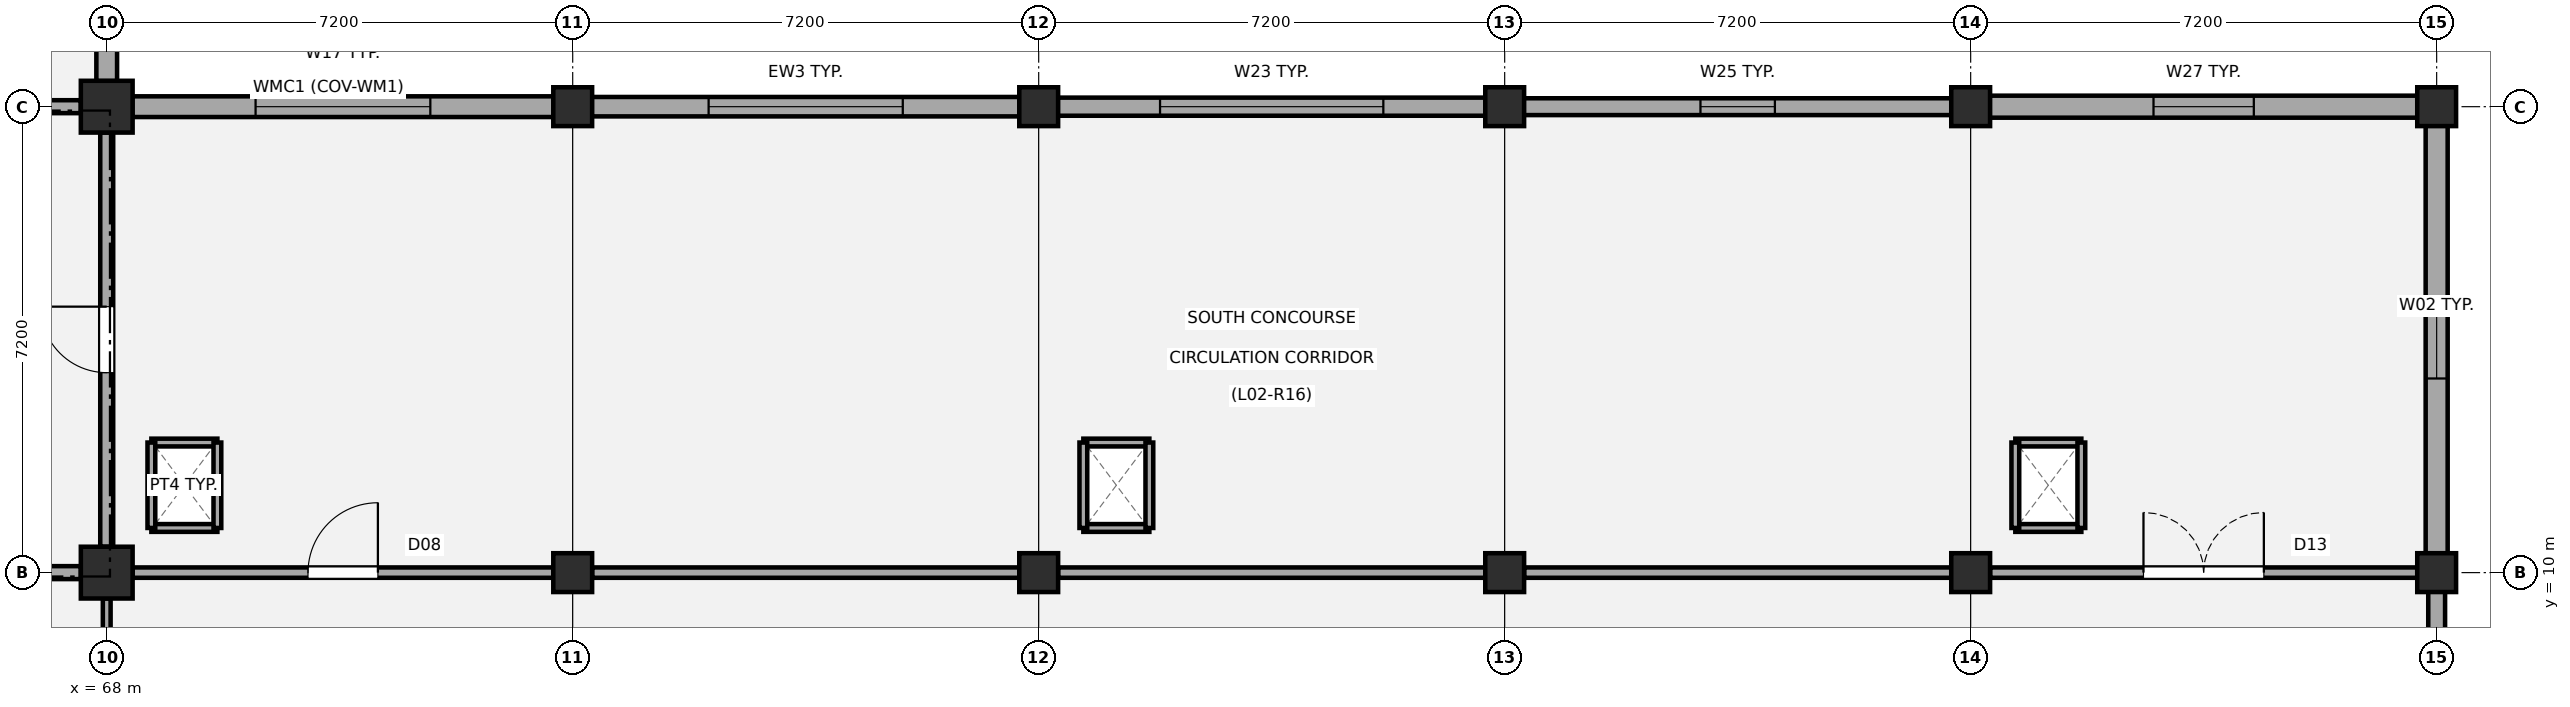
"""IFC4 building model, lengths in metres.
Left out: names, types, materials, properties, quantities, classifications, styles, units other than length and angle.
Written with IfcOpenShell. Run it as: python <this file> out.ifc"""

import sys

from ifc_helpers import new_model, si_unit, direction, frame, frame_2d, origin, origin_2d, place, context, subcontext, project, spatial, rectangle, extrude, element, fill, save


model = new_model("IFC4")
c1 = context("Model", 3, precision=1e-05, world=origin(), true_north=direction((0.0, 1.0)))
c2 = subcontext(c1, "Body", "Model", "MODEL_VIEW")
j1 = project(units=[si_unit("LENGTHUNIT", "METRE"), si_unit("PLANEANGLEUNIT", "RADIAN")], contexts=[c1])
p1 = place(None, origin())
s1 = spatial("IfcSite", under=j1, at=p1, CompositionType="ELEMENT")
p2 = place(p1, origin())
s2 = spatial("IfcBuilding", under=s1, at=p2, CompositionType="ELEMENT")
p3 = place(p2, frame((0.0, 0.0, 9.18)))
s3 = spatial("IfcBuildingStorey", under=s2, at=p3, CompositionType="ELEMENT", Elevation=9.18)
for number, where, z_axis, x_axis in (
    (1, (68.0, 10.0, 0.0), (0.0, 0.0, 1.0), (1.0, 0.0, 0.0)),
    (2, (68.0, 17.2, 0.0), (0.0, 0.0, 1.0), (1.0, 0.0, 0.0)),
):
    element("IfcColumn", number, at=place(p3, frame(where, z_axis=z_axis, x_axis=x_axis)), inside=s3, PredefinedType="COLUMN", context=c2, shape_type="SweptSolid", body=[
        extrude(rectangle(XDim=0.8, YDim=0.8, at=origin_2d()), origin(), (0.0, 0.0, 1.0), 4.32),
    ])
for number, where, z_axis, x_axis in (
    (3, (75.2, 10.0, 0.0), (0.0, 0.0, 1.0), (1.0, 0.0, 0.0)),
    (4, (75.2, 17.2, 0.0), (0.0, 0.0, 1.0), (1.0, 0.0, 0.0)),
    (5, (82.4, 10.0, 0.0), (0.0, 0.0, 1.0), (1.0, 0.0, 0.0)),
    (6, (82.4, 17.2, 0.0), (0.0, 0.0, 1.0), (1.0, 0.0, 0.0)),
    (7, (89.6, 10.0, 0.0), (0.0, 0.0, 1.0), (1.0, 0.0, 0.0)),
    (8, (89.6, 17.2, 0.0), (0.0, 0.0, 1.0), (1.0, 0.0, 0.0)),
    (9, (96.8, 10.0, 0.0), (0.0, 0.0, 1.0), (1.0, 0.0, 0.0)),
    (10, (96.8, 17.2, 0.0), (0.0, 0.0, 1.0), (1.0, 0.0, 0.0)),
    (11, (104.0, 10.0, 0.0), (0.0, 0.0, 1.0), (1.0, 0.0, 0.0)),
    (12, (104.0, 17.2, 0.0), (0.0, 0.0, 1.0), (1.0, 0.0, 0.0)),
):
    element("IfcColumn", number, at=place(p3, frame(where, z_axis=z_axis, x_axis=x_axis)), inside=s3, PredefinedType="COLUMN", context=c2, shape_type="SweptSolid", body=[
        extrude(rectangle(XDim=0.6, YDim=0.6, at=origin_2d()), origin(), (0.0, 0.0, 1.0), 4.32),
    ])
p4 = place(p3, frame((68.395, 17.2, 0.0), z_axis=(0.0, 0.0, 1.0), x_axis=(1.0, 0.0, 0.0)))
e13 = element("IfcWall", 13, at=p4, inside=s3, PredefinedType="STANDARD", context=c2, shape_type="SweptSolid", body=[
    extrude(rectangle(XDim=6.51, YDim=0.32, at=frame_2d((3.255, 0.0))), origin(), (0.0, 0.0, 1.0), 3.48),
])
p5 = place(p4, frame((1.905, 0.0, 0.95)))
e14 = element("IfcOpeningElement", 14, at=p5, cuts=e13, PredefinedType="OPENING", context=c2, shape_type="SweptSolid", body=[
    extrude(rectangle(XDim=2.7, YDim=1.7, at=frame_2d((1.35, 0.85))), frame((0.0, 0.17, 0.0), z_axis=(0.0, -1.0, 0.0), x_axis=(1.0, 0.0, 0.0)), (0.0, 0.0, 1.0), 0.34),
])
p6 = place(p3, frame((75.495, 17.2, 0.0), z_axis=(0.0, 0.0, 1.0), x_axis=(1.0, 0.0, 0.0)))
e15 = element("IfcWall", 15, at=p6, inside=s3, PredefinedType="STANDARD", context=c2, shape_type="SweptSolid", body=[
    extrude(rectangle(XDim=6.61, YDim=0.3, at=frame_2d((3.305, 0.0))), origin(), (0.0, 0.0, 1.0), 3.48),
])
p7 = place(p6, frame((1.805, 0.0, 0.95)))
e16 = element("IfcOpeningElement", 16, at=p7, cuts=e15, PredefinedType="OPENING", context=c2, shape_type="SweptSolid", body=[
    extrude(rectangle(XDim=3.0, YDim=1.85, at=frame_2d((1.5, 0.925))), frame((0.0, 0.16, 0.0), z_axis=(0.0, -1.0, 0.0), x_axis=(1.0, 0.0, 0.0)), (0.0, 0.0, 1.0), 0.32),
])
p8 = place(p3, frame((82.695, 17.2, 0.0), z_axis=(0.0, 0.0, 1.0), x_axis=(1.0, 0.0, 0.0)))
e17 = element("IfcWall", 17, at=p8, inside=s3, PredefinedType="STANDARD", context=c2, shape_type="SweptSolid", body=[
    extrude(rectangle(XDim=6.61, YDim=0.28, at=frame_2d((3.305, 0.0))), origin(), (0.0, 0.0, 1.0), 3.48),
])
p9 = place(p8, frame((1.58, 0.0, 0.95)))
e18 = element("IfcOpeningElement", 18, at=p9, cuts=e17, PredefinedType="OPENING", context=c2, shape_type="SweptSolid", body=[
    extrude(rectangle(XDim=3.45, YDim=2.0, at=frame_2d((1.725, 1.0))), frame((0.0, 0.15, 0.0), z_axis=(0.0, -1.0, 0.0), x_axis=(1.0, 0.0, 0.0)), (0.0, 0.0, 1.0), 0.3),
])
p10 = place(p3, frame((89.895, 17.2, 0.0), z_axis=(0.0, 0.0, 1.0), x_axis=(1.0, 0.0, 0.0)))
e19 = element("IfcWall", 19, at=p10, inside=s3, PredefinedType="STANDARD", context=c2, shape_type="SweptSolid", body=[
    extrude(rectangle(XDim=6.61, YDim=0.26, at=frame_2d((3.305, 0.0))), origin(), (0.0, 0.0, 1.0), 3.48),
])
p11 = place(p10, frame((2.73, 0.0, 0.95)))
e20 = element("IfcOpeningElement", 20, at=p11, cuts=e19, PredefinedType="OPENING", context=c2, shape_type="SweptSolid", body=[
    extrude(rectangle(XDim=1.15, YDim=1.15, at=frame_2d((0.575, 0.575))), frame((0.0, 0.14, 0.0), z_axis=(0.0, -1.0, 0.0), x_axis=(1.0, 0.0, 0.0)), (0.0, 0.0, 1.0), 0.28),
])
p12 = place(p3, frame((97.095, 17.2, 0.0), z_axis=(0.0, 0.0, 1.0), x_axis=(1.0, 0.0, 0.0)))
e21 = element("IfcWall", 21, at=p12, inside=s3, PredefinedType="STANDARD", context=c2, shape_type="SweptSolid", body=[
    extrude(rectangle(XDim=6.61, YDim=0.34, at=frame_2d((3.305, 0.0))), origin(), (0.0, 0.0, 1.0), 3.48),
])
p13 = place(p12, frame((2.53, 0.0, 0.95)))
e22 = element("IfcOpeningElement", 22, at=p13, cuts=e21, PredefinedType="OPENING", context=c2, shape_type="SweptSolid", body=[
    extrude(rectangle(XDim=1.55, YDim=1.25, at=frame_2d((0.775, 0.625))), frame((0.0, 0.18, 0.0), z_axis=(0.0, -1.0, 0.0), x_axis=(1.0, 0.0, 0.0)), (0.0, 0.0, 1.0), 0.36),
])
p14 = place(p3, frame((68.0, 24.005, 0.0), z_axis=(0.0, 0.0, 1.0), x_axis=(0.0, -1.0, 0.0)))
e23 = element("IfcWall", 23, at=p14, inside=s3, PredefinedType="STANDARD", context=c2, shape_type="SweptSolid", body=[
    extrude(rectangle(XDim=6.41, YDim=0.32, at=frame_2d((3.205, 0.0))), origin(), (0.0, 0.0, 1.0), 3.48),
])
p15 = place(p3, frame((104.0, 9.705, 0.0), z_axis=(0.0, 0.0, 1.0), x_axis=(0.0, -1.0, 0.0)))
e24 = element("IfcWall", 24, at=p15, inside=s3, PredefinedType="STANDARD", context=c2, shape_type="SweptSolid", body=[
    extrude(rectangle(XDim=7.985, YDim=0.26, at=frame_2d((3.993, 0.0))), origin(), (0.0, 0.0, 1.0), 3.48),
])
p16 = place(p15, frame((3.442, 0.0, 0.95)))
e25 = element("IfcOpeningElement", 25, at=p16, cuts=e24, PredefinedType="OPENING", context=c2, shape_type="SweptSolid", body=[
    extrude(rectangle(XDim=1.1, YDim=1.4, at=frame_2d((0.55, 0.7))), frame((0.0, 0.14, 0.0), z_axis=(0.0, -1.0, 0.0), x_axis=(1.0, 0.0, 0.0)), (0.0, 0.0, 1.0), 0.28),
])
p17 = place(p3, frame((104.0, 16.905, 0.0), z_axis=(0.0, 0.0, 1.0), x_axis=(0.0, -1.0, 0.0)))
e26 = element("IfcWall", 26, at=p17, inside=s3, PredefinedType="STANDARD", context=c2, shape_type="SweptSolid", body=[
    extrude(rectangle(XDim=6.61, YDim=0.34, at=frame_2d((3.305, 0.0))), origin(), (0.0, 0.0, 1.0), 3.48),
])
p18 = place(p17, frame((2.705, 0.0, 0.95)))
e27 = element("IfcOpeningElement", 27, at=p18, cuts=e26, PredefinedType="OPENING", context=c2, shape_type="SweptSolid", body=[
    extrude(rectangle(XDim=1.2, YDim=1.5, at=frame_2d((0.6, 0.75))), frame((0.0, 0.18, 0.0), z_axis=(0.0, -1.0, 0.0), x_axis=(1.0, 0.0, 0.0)), (0.0, 0.0, 1.0), 0.36),
])
p19 = place(p3, frame((68.0, 10.4, 0.0), z_axis=(0.0, 0.0, 1.0), x_axis=(0.0, 1.0, 0.0)))
e28 = element("IfcWall", 28, at=p19, inside=s3, PredefinedType="PARTITIONING", context=c2, shape_type="SweptSolid", body=[
    extrude(rectangle(XDim=6.4, YDim=0.2, at=frame_2d((3.2, 0.0))), origin(), (0.0, 0.0, 1.0), 3.43),
])
p20 = place(p19, frame((2.69, 0.0, 0.0)))
e29 = element("IfcOpeningElement", 29, at=p20, cuts=e28, PredefinedType="OPENING", context=c2, shape_type="SweptSolid", body=[
    extrude(rectangle(XDim=1.02, YDim=2.15, at=frame_2d((0.51, 1.075))), frame((0.0, 0.11, 0.0), z_axis=(0.0, -1.0, 0.0), x_axis=(1.0, 0.0, 0.0)), (0.0, 0.0, 1.0), 0.22),
])
p21 = place(p3, frame((65.34, 10.0, 0.0), z_axis=(0.0, 0.0, 1.0), x_axis=(1.0, 0.0, 0.0)))
e30 = element("IfcWall", 30, at=p21, inside=s3, PredefinedType="PARTITIONING", context=c2, shape_type="SweptSolid", body=[
    extrude(rectangle(XDim=2.26, YDim=0.2, at=frame_2d((1.13, 0.0))), origin(), (0.0, 0.0, 1.0), 3.41),
])
p22 = place(p3, frame((65.34, 17.2, 0.0), z_axis=(0.0, 0.0, 1.0), x_axis=(1.0, 0.0, 0.0)))
e31 = element("IfcWall", 31, at=p22, inside=s3, PredefinedType="PARTITIONING", context=c2, shape_type="SweptSolid", body=[
    extrude(rectangle(XDim=2.26, YDim=0.2, at=frame_2d((1.13, 0.0))), origin(), (0.0, 0.0, 1.0), 3.38),
])
for number, where, z_axis, x_axis in (
    (32, (68.69, 10.69, 0.0), (0.0, 0.0, 1.0), (1.0, 0.0, 0.0)),
    (33, (68.69, 12.01, 0.0), (0.0, 0.0, 1.0), (1.0, 0.0, 0.0)),
):
    element("IfcWall", number, at=place(p3, frame(where, z_axis=z_axis, x_axis=x_axis)), inside=s3, PredefinedType="PARTITIONING", context=c2, shape_type="SweptSolid", body=[
        extrude(rectangle(XDim=1.02, YDim=0.12, at=frame_2d((0.51, 0.0))), origin(), (0.0, 0.0, 1.0), 4.02),
    ])
for number, where, z_axis, x_axis in (
    (34, (68.69, 10.69, 0.0), (0.0, 0.0, 1.0), (0.0, 1.0, 0.0)),
    (35, (69.71, 10.69, 0.0), (0.0, 0.0, 1.0), (0.0, 1.0, 0.0)),
):
    element("IfcWall", number, at=place(p3, frame(where, z_axis=z_axis, x_axis=x_axis)), inside=s3, PredefinedType="PARTITIONING", context=c2, shape_type="SweptSolid", body=[
        extrude(rectangle(XDim=1.32, YDim=0.12, at=frame_2d((0.66, 0.0))), origin(), (0.0, 0.0, 1.0), 4.02),
    ])
for number, where, z_axis, x_axis in (
    (36, (83.09, 10.69, 0.0), (0.0, 0.0, 1.0), (1.0, 0.0, 0.0)),
    (37, (83.09, 12.01, 0.0), (0.0, 0.0, 1.0), (1.0, 0.0, 0.0)),
):
    element("IfcWall", number, at=place(p3, frame(where, z_axis=z_axis, x_axis=x_axis)), inside=s3, PredefinedType="PARTITIONING", context=c2, shape_type="SweptSolid", body=[
        extrude(rectangle(XDim=1.02, YDim=0.12, at=frame_2d((0.51, 0.0))), origin(), (0.0, 0.0, 1.0), 4.02),
    ])
for number, where, z_axis, x_axis in (
    (38, (83.09, 10.69, 0.0), (0.0, 0.0, 1.0), (0.0, 1.0, 0.0)),
    (39, (84.11, 10.69, 0.0), (0.0, 0.0, 1.0), (0.0, 1.0, 0.0)),
):
    element("IfcWall", number, at=place(p3, frame(where, z_axis=z_axis, x_axis=x_axis)), inside=s3, PredefinedType="PARTITIONING", context=c2, shape_type="SweptSolid", body=[
        extrude(rectangle(XDim=1.32, YDim=0.12, at=frame_2d((0.66, 0.0))), origin(), (0.0, 0.0, 1.0), 4.02),
    ])
for number, where, z_axis, x_axis in (
    (40, (97.49, 10.69, 0.0), (0.0, 0.0, 1.0), (1.0, 0.0, 0.0)),
    (41, (97.49, 12.01, 0.0), (0.0, 0.0, 1.0), (1.0, 0.0, 0.0)),
):
    element("IfcWall", number, at=place(p3, frame(where, z_axis=z_axis, x_axis=x_axis)), inside=s3, PredefinedType="PARTITIONING", context=c2, shape_type="SweptSolid", body=[
        extrude(rectangle(XDim=1.02, YDim=0.12, at=frame_2d((0.51, 0.0))), origin(), (0.0, 0.0, 1.0), 4.02),
    ])
for number, where, z_axis, x_axis in (
    (42, (97.49, 10.69, 0.0), (0.0, 0.0, 1.0), (0.0, 1.0, 0.0)),
    (43, (98.51, 10.69, 0.0), (0.0, 0.0, 1.0), (0.0, 1.0, 0.0)),
):
    element("IfcWall", number, at=place(p3, frame(where, z_axis=z_axis, x_axis=x_axis)), inside=s3, PredefinedType="PARTITIONING", context=c2, shape_type="SweptSolid", body=[
        extrude(rectangle(XDim=1.32, YDim=0.12, at=frame_2d((0.66, 0.0))), origin(), (0.0, 0.0, 1.0), 4.02),
    ])
p23 = place(p3, frame((68.0, 3.2, 0.0), z_axis=(0.0, 0.0, 1.0), x_axis=(0.0, 1.0, 0.0)))
e44 = element("IfcWall", 44, at=p23, inside=s3, PredefinedType="PARTITIONING", context=c2, shape_type="SweptSolid", body=[
    extrude(rectangle(XDim=6.4, YDim=0.12, at=frame_2d((3.2, 0.0))), origin(), (0.0, 0.0, 1.0), 3.36),
])
p24 = place(p3, frame((68.4, 10.0, 0.0), z_axis=(0.0, 0.0, 1.0), x_axis=(1.0, 0.0, 0.0)))
e45 = element("IfcWall", 45, at=p24, inside=s3, PredefinedType="PARTITIONING", context=c2, shape_type="SweptSolid", body=[
    extrude(rectangle(XDim=6.5, YDim=0.16, at=frame_2d((3.25, 0.0))), origin(), (0.0, 0.0, 1.0), 3.38),
])
p25 = place(p24, frame((2.71, 0.0, 0.0)))
e46 = element("IfcOpeningElement", 46, at=p25, cuts=e45, PredefinedType="OPENING", context=c2, shape_type="SweptSolid", body=[
    extrude(rectangle(XDim=1.08, YDim=2.16, at=frame_2d((0.54, 1.08))), frame((0.0, 0.09, 0.0), z_axis=(0.0, -1.0, 0.0), x_axis=(1.0, 0.0, 0.0)), (0.0, 0.0, 1.0), 0.18),
])
p26 = place(p3, frame((75.5, 10.0, 0.0), z_axis=(0.0, 0.0, 1.0), x_axis=(1.0, 0.0, 0.0)))
e47 = element("IfcWall", 47, at=p26, inside=s3, PredefinedType="PARTITIONING", context=c2, shape_type="SweptSolid", body=[
    extrude(rectangle(XDim=6.6, YDim=0.16, at=frame_2d((3.3, 0.0))), origin(), (0.0, 0.0, 1.0), 3.43),
])
p27 = place(p3, frame((82.7, 10.0, 0.0), z_axis=(0.0, 0.0, 1.0), x_axis=(1.0, 0.0, 0.0)))
e48 = element("IfcWall", 48, at=p27, inside=s3, PredefinedType="PARTITIONING", context=c2, shape_type="SweptSolid", body=[
    extrude(rectangle(XDim=6.6, YDim=0.16, at=frame_2d((3.3, 0.0))), origin(), (0.0, 0.0, 1.0), 3.38),
])
p28 = place(p3, frame((89.9, 10.0, 0.0), z_axis=(0.0, 0.0, 1.0), x_axis=(1.0, 0.0, 0.0)))
e49 = element("IfcWall", 49, at=p28, inside=s3, PredefinedType="PARTITIONING", context=c2, shape_type="SweptSolid", body=[
    extrude(rectangle(XDim=6.6, YDim=0.16, at=frame_2d((3.3, 0.0))), origin(), (0.0, 0.0, 1.0), 3.43),
])
p29 = place(p3, frame((97.1, 10.0, 0.0), z_axis=(0.0, 0.0, 1.0), x_axis=(1.0, 0.0, 0.0)))
e50 = element("IfcWall", 50, at=p29, inside=s3, PredefinedType="PARTITIONING", context=c2, shape_type="SweptSolid", body=[
    extrude(rectangle(XDim=6.6, YDim=0.16, at=frame_2d((3.3, 0.0))), origin(), (0.0, 0.0, 1.0), 3.38),
])
p30 = place(p29, frame((2.37, 0.0, 0.0)))
e51 = element("IfcOpeningElement", 51, at=p30, cuts=e50, PredefinedType="OPENING", context=c2, shape_type="SweptSolid", body=[
    extrude(rectangle(XDim=1.86, YDim=2.26, at=frame_2d((0.93, 1.13))), frame((0.0, 0.09, 0.0), z_axis=(0.0, -1.0, 0.0), x_axis=(1.0, 0.0, 0.0)), (0.0, 0.0, 1.0), 0.18),
])
p31 = place(p5, origin())
e52 = element("IfcWindow", 52, at=p31, inside=s3, PartitioningType="SINGLE_PANEL", PredefinedType="WINDOW", context=c2, shape_type="SweptSolid", body=[
    extrude(rectangle(XDim=2.7, YDim=1.7, at=frame_2d((1.35, 0.85))), frame((0.0, 0.03, 0.0), z_axis=(0.0, -1.0, 0.0), x_axis=(1.0, 0.0, 0.0)), (0.0, 0.0, 1.0), 0.06),
])
fill(e14, e52)
p32 = place(p7, origin())
e53 = element("IfcWindow", 53, at=p32, inside=s3, PartitioningType="SINGLE_PANEL", PredefinedType="WINDOW", context=c2, shape_type="SweptSolid", body=[
    extrude(rectangle(XDim=3.0, YDim=1.85, at=frame_2d((1.5, 0.925))), frame((0.0, 0.03, 0.0), z_axis=(0.0, -1.0, 0.0), x_axis=(1.0, 0.0, 0.0)), (0.0, 0.0, 1.0), 0.06),
])
fill(e16, e53)
p33 = place(p9, origin())
e54 = element("IfcWindow", 54, at=p33, inside=s3, PartitioningType="SINGLE_PANEL", PredefinedType="WINDOW", context=c2, shape_type="SweptSolid", body=[
    extrude(rectangle(XDim=3.45, YDim=2.0, at=frame_2d((1.725, 1.0))), frame((0.0, 0.03, 0.0), z_axis=(0.0, -1.0, 0.0), x_axis=(1.0, 0.0, 0.0)), (0.0, 0.0, 1.0), 0.06),
])
fill(e18, e54)
p34 = place(p11, origin())
e55 = element("IfcWindow", 55, at=p34, inside=s3, PartitioningType="SINGLE_PANEL", PredefinedType="WINDOW", context=c2, shape_type="SweptSolid", body=[
    extrude(rectangle(XDim=1.15, YDim=1.15, at=frame_2d((0.575, 0.575))), frame((0.0, 0.03, 0.0), z_axis=(0.0, -1.0, 0.0), x_axis=(1.0, 0.0, 0.0)), (0.0, 0.0, 1.0), 0.06),
])
fill(e20, e55)
p35 = place(p13, origin())
e56 = element("IfcWindow", 56, at=p35, inside=s3, PartitioningType="SINGLE_PANEL", PredefinedType="WINDOW", context=c2, shape_type="SweptSolid", body=[
    extrude(rectangle(XDim=1.55, YDim=1.25, at=frame_2d((0.775, 0.625))), frame((0.0, 0.03, 0.0), z_axis=(0.0, -1.0, 0.0), x_axis=(1.0, 0.0, 0.0)), (0.0, 0.0, 1.0), 0.06),
])
fill(e22, e56)
p36 = place(p18, origin())
e57 = element("IfcWindow", 57, at=p36, inside=s3, PartitioningType="SINGLE_PANEL", PredefinedType="WINDOW", context=c2, shape_type="SweptSolid", body=[
    extrude(rectangle(XDim=1.2, YDim=1.5, at=frame_2d((0.6, 0.75))), frame((0.0, 0.03, 0.0), z_axis=(0.0, -1.0, 0.0), x_axis=(1.0, 0.0, 0.0)), (0.0, 0.0, 1.0), 0.06),
])
fill(e27, e57)
p37 = place(p20, origin())
e58 = element("IfcDoor", 58, at=p37, inside=s3, OperationType="SINGLE_SWING_RIGHT", PredefinedType="DOOR", context=c2, shape_type="SweptSolid", body=[
    extrude(rectangle(XDim=1.02, YDim=2.15, at=frame_2d((0.51, 1.075))), frame((0.0, 0.025, 0.0), z_axis=(0.0, -1.0, 0.0), x_axis=(1.0, 0.0, 0.0)), (0.0, 0.0, 1.0), 0.05),
])
fill(e29, e58)
p38 = place(p25, origin())
e59 = element("IfcDoor", 59, at=p38, inside=s3, OperationType="SINGLE_SWING_RIGHT", PredefinedType="DOOR", context=c2, shape_type="SweptSolid", body=[
    extrude(rectangle(XDim=1.08, YDim=2.16, at=frame_2d((0.54, 1.08))), frame((0.0, 0.025, 0.0), z_axis=(0.0, -1.0, 0.0), x_axis=(1.0, 0.0, 0.0)), (0.0, 0.0, 1.0), 0.05),
])
fill(e46, e59)
p39 = place(p30, origin())
e60 = element("IfcDoor", 60, at=p39, inside=s3, OperationType="DOUBLE_DOOR_SINGLE_SWING", PredefinedType="DOOR", context=c2, shape_type="SweptSolid", body=[
    extrude(rectangle(XDim=1.86, YDim=2.26, at=frame_2d((0.93, 1.13))), frame((0.0, 0.025, 0.0), z_axis=(0.0, -1.0, 0.0), x_axis=(1.0, 0.0, 0.0)), (0.0, 0.0, 1.0), 0.05),
])
fill(e51, e60)
save(model, sys.argv[1])
